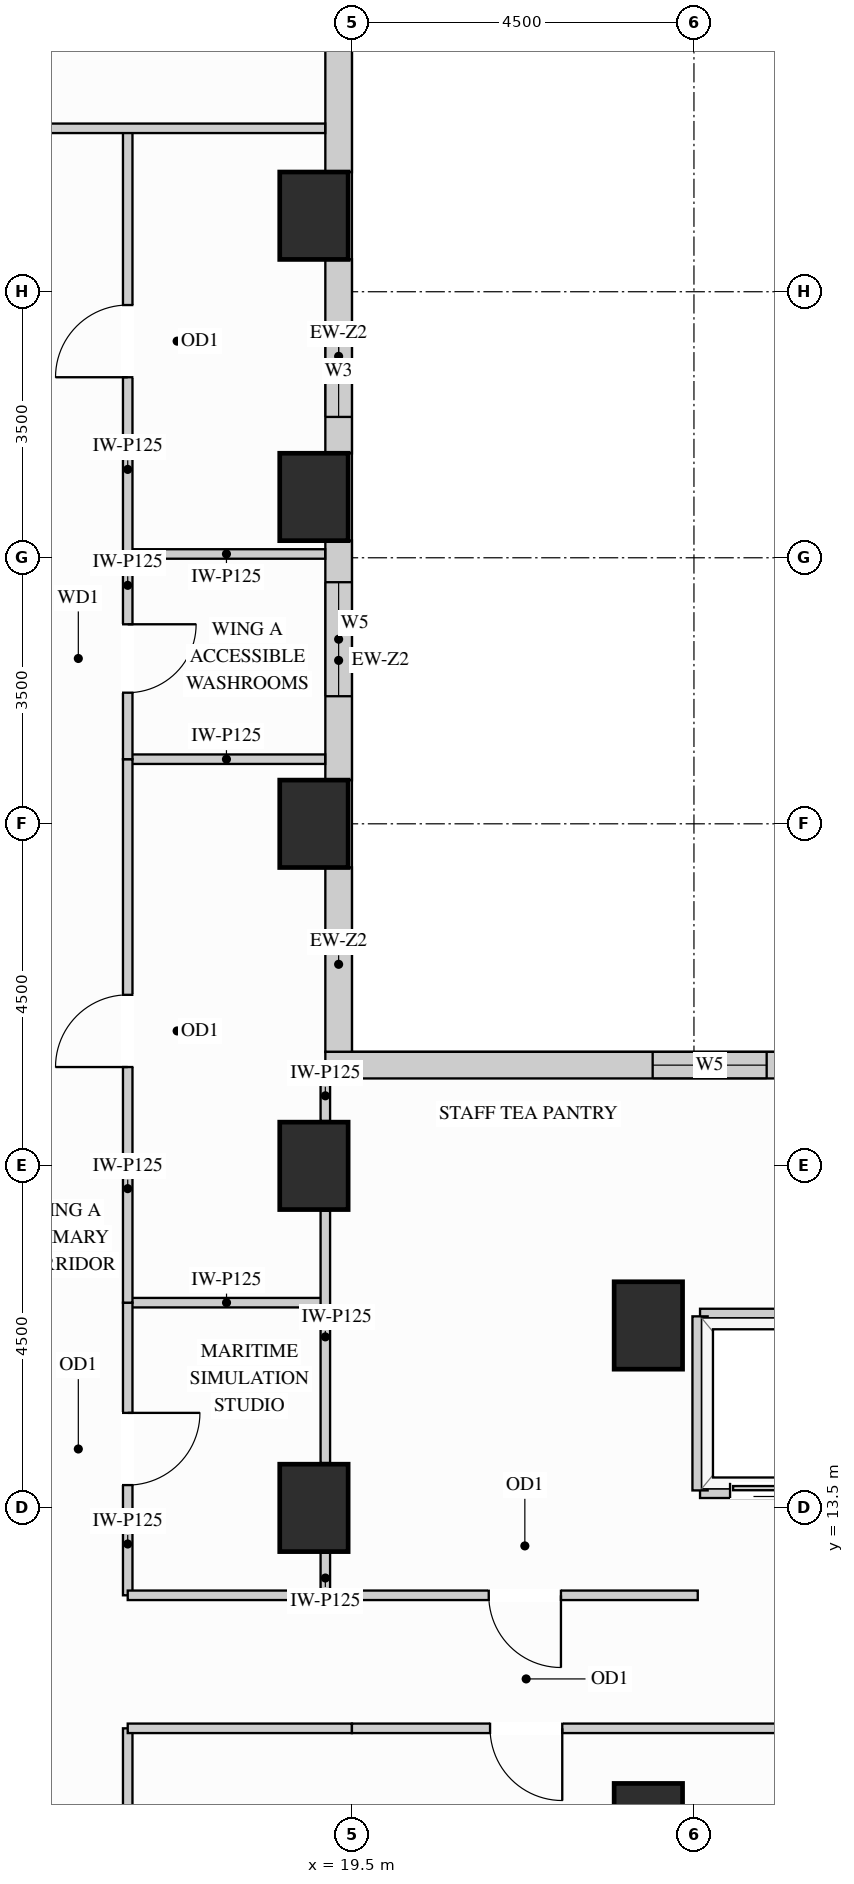
"""IFC4 building model, lengths in metres.
Left out: names, types, materials, properties, quantities, classifications, styles, units other than length and angle.
Written with IfcOpenShell. Run it as: python <this file> out.ifc"""

import sys

from ifc_helpers import new_model, si_unit, direction, frame, frame_2d, origin, origin_2d, place, context, subcontext, project, spatial, rectangle, extrude, source, transform, mapped, element, fill, save


model = new_model("IFC4")
c1 = context("Model", 3, precision=1e-05, world=origin(), true_north=direction((0.0, 1.0)))
c2 = subcontext(c1, "Body", "Model", "MODEL_VIEW")
j1 = project(units=[si_unit("LENGTHUNIT", "METRE"), si_unit("PLANEANGLEUNIT", "RADIAN")], contexts=[c1])
p1 = place(None, origin())
s1 = spatial("IfcSite", under=j1, at=p1, CompositionType="ELEMENT")
p2 = place(p1, origin())
s2 = spatial("IfcBuilding", under=s1, at=p2, CompositionType="ELEMENT")
p3 = place(p2, frame((0.0, 0.0, 102.6)))
s3 = spatial("IfcBuildingStorey", under=s2, at=p3, CompositionType="ELEMENT", Elevation=102.6)
m1 = source(origin(), c2, "Body", "SweptSolid", [
    extrude(rectangle(XDim=0.9, YDim=1.15, at=origin_2d()), origin(), (0.0, 0.0, 1.0), 3.38),
])
for number, where, z_axis, x_axis in (
    (1, (19.0, 13.5, 0.0), (0.0, 0.0, 1.0), (1.0, 0.0, 0.0)),
    (2, (19.0, 18.0, 0.0), (0.0, 0.0, 1.0), (1.0, 0.0, 0.0)),
    (3, (19.0, 22.5, 0.0), (0.0, 0.0, 1.0), (1.0, 0.0, 0.0)),
    (4, (19.0, 26.8, 0.0), (0.0, 0.0, 1.0), (1.0, 0.0, 0.0)),
    (5, (19.0, 30.5, 0.0), (0.0, 0.0, 1.0), (1.0, 0.0, 0.0)),
    (6, (23.4, 15.9, 0.0), (0.0, 0.0, 1.0), (1.0, 0.0, 0.0)),
    (7, (23.4, 9.3, 0.0), (0.0, 0.0, 1.0), (1.0, 0.0, 0.0)),
):
    element("IfcColumn", number, at=place(p3, frame(where, z_axis=z_axis, x_axis=x_axis)), inside=s3, PredefinedType="COLUMN", context=c2, shape_type="MappedRepresentation", body=[
        mapped(m1, transform((0.0, 0.0, 0.0), x_axis=(1.0, 0.0, 0.0), y_axis=(0.0, 1.0, 0.0), z_axis=(0.0, 0.0, 1.0))),
    ])
m2 = source(origin(), c2, "Body", "SweptSolid", [
    extrude(rectangle(XDim=2.429, YDim=0.35, at=frame_2d((1.214, 0.0))), origin(), (0.0, 0.0, 1.0), 2.519),
])
p4 = place(p3, frame((19.325, 19.498, 0.0), z_axis=(0.0, 0.0, 1.0), x_axis=(0.0, 1.0, 0.0)))
e8 = element("IfcWall", 8, at=p4, inside=s3, PredefinedType="SOLIDWALL", context=c2, shape_type="MappedRepresentation", body=[
    mapped(m2, transform((0.0, 0.0, 0.0), x_axis=(1.0, 0.0, 0.0), y_axis=(0.0, 1.0, 0.0), z_axis=(0.0, 0.0, 1.0))),
])
p5 = place(p3, frame((19.325, 23.073, 0.0), z_axis=(0.0, 0.0, 1.0), x_axis=(0.0, 1.0, 0.0)))
e9 = element("IfcWall", 9, at=p5, inside=s3, PredefinedType="SOLIDWALL", context=c2, shape_type="SweptSolid", body=[
    extrude(rectangle(XDim=3.154, YDim=0.35, at=frame_2d((1.577, 0.0))), origin(), (0.0, 0.0, 1.0), 2.519),
])
p6 = place(p5, frame((1.105, 0.0, 0.78)))
e10 = element("IfcOpeningElement", 10, at=p6, cuts=e9, PredefinedType="OPENING", context=c2, shape_type="SweptSolid", body=[
    extrude(rectangle(XDim=1.5, YDim=1.559, at=frame_2d((0.75, 0.78))), frame((0.0, 0.185, 0.0), z_axis=(0.0, -1.0, 0.0), x_axis=(1.0, 0.0, 0.0)), (0.0, 0.0, 1.0), 0.37),
])
p7 = place(p3, frame((19.325, 27.373, 0.0), z_axis=(0.0, 0.0, 1.0), x_axis=(0.0, 1.0, 0.0)))
e11 = element("IfcWall", 11, at=p7, inside=s3, PredefinedType="SOLIDWALL", context=c2, shape_type="SweptSolid", body=[
    extrude(rectangle(XDim=2.554, YDim=0.35, at=frame_2d((1.277, 0.0))), origin(), (0.0, 0.0, 1.0), 2.519),
])
p8 = place(p7, frame((0.48, 0.0, 0.78)))
e12 = element("IfcOpeningElement", 12, at=p8, cuts=e11, PredefinedType="OPENING", context=c2, shape_type="SweptSolid", body=[
    extrude(rectangle(XDim=1.2, YDim=1.559, at=frame_2d((0.6, 0.78))), frame((0.0, 0.185, 0.0), z_axis=(0.0, -1.0, 0.0), x_axis=(1.0, 0.0, 0.0)), (0.0, 0.0, 1.0), 0.37),
])
m3 = source(origin(), c2, "Body", "SweptSolid", [
    extrude(rectangle(XDim=3.354, YDim=0.35, at=frame_2d((1.677, 0.0))), origin(), (0.0, 0.0, 1.0), 2.519),
])
p9 = place(p3, frame((19.325, 31.073, 0.0), z_axis=(0.0, 0.0, 1.0), x_axis=(0.0, 1.0, 0.0)))
e13 = element("IfcWall", 13, at=p9, inside=s3, PredefinedType="SOLIDWALL", context=c2, shape_type="MappedRepresentation", body=[
    mapped(m3, transform((0.0, 0.0, 0.0), x_axis=(1.0, 0.0, 0.0), y_axis=(0.0, 1.0, 0.0), z_axis=(0.0, 0.0, 1.0))),
])
p10 = place(p3, frame((34.75, 19.325, 0.0), z_axis=(0.0, 0.0, 1.0), x_axis=(-1.0, 0.0, 0.0)))
e14 = element("IfcWall", 14, at=p10, inside=s3, PredefinedType="SOLIDWALL", context=c2, shape_type="SweptSolid", body=[
    extrude(rectangle(XDim=15.6, YDim=0.35, at=frame_2d((7.8, 0.0))), origin(), (0.0, 0.0, 1.0), 3.365),
])
p11 = place(p10, frame((4.307, 0.0, 0.78)))
e15 = element("IfcOpeningElement", 15, at=p11, cuts=e14, PredefinedType="OPENING", context=c2, shape_type="SweptSolid", body=[
    extrude(rectangle(XDim=1.5, YDim=2.0, at=frame_2d((0.75, 1.0))), frame((0.0, 0.185, 0.0), z_axis=(0.0, -1.0, 0.0), x_axis=(1.0, 0.0, 0.0)), (0.0, 0.0, 1.0), 0.37),
])
p12 = place(p10, frame((9.793, 0.0, 0.78)))
e16 = element("IfcOpeningElement", 16, at=p12, cuts=e14, PredefinedType="OPENING", context=c2, shape_type="SweptSolid", body=[
    extrude(rectangle(XDim=1.5, YDim=2.0, at=frame_2d((0.75, 1.0))), frame((0.0, 0.185, 0.0), z_axis=(0.0, -1.0, 0.0), x_axis=(1.0, 0.0, 0.0)), (0.0, 0.0, 1.0), 0.37),
])
m4 = source(origin(), c2, "Body", "SweptSolid", [
    extrude(rectangle(XDim=2.6, YDim=0.125, at=frame_2d((1.3, 0.0))), origin(), (0.0, 0.0, 1.0), 3.365),
])
p13 = place(p3, frame((16.55, 16.2, 0.0), z_axis=(0.0, 0.0, 1.0), x_axis=(1.0, 0.0, 0.0)))
e17 = element("IfcWall", 17, at=p13, inside=s3, PredefinedType="PARTITIONING", context=c2, shape_type="MappedRepresentation", body=[
    mapped(m4, transform((0.0, 0.0, 0.0), x_axis=(1.0, 0.0, 0.0), y_axis=(0.0, 1.0, 0.0), z_axis=(0.0, 0.0, 1.0))),
])
m5 = source(origin(), c2, "Body", "SweptSolid", [
    extrude(rectangle(XDim=2.598, YDim=0.125, at=frame_2d((1.299, 0.0))), origin(), (0.0, 0.0, 1.0), 3.365),
])
for number, where, z_axis, x_axis in (
    (18, (16.55, 23.35, 0.0), (0.0, 0.0, 1.0), (1.0, 0.0, 0.0)),
    (19, (16.55, 26.05, 0.0), (0.0, 0.0, 1.0), (1.0, 0.0, 0.0)),
):
    element("IfcWall", number, at=place(p3, frame(where, z_axis=z_axis, x_axis=x_axis)), inside=s3, PredefinedType="PARTITIONING", context=c2, shape_type="MappedRepresentation", body=[
        mapped(m5, transform((0.0, 0.0, 0.0), x_axis=(1.0, 0.0, 0.0), y_axis=(0.0, 1.0, 0.0), z_axis=(0.0, 0.0, 1.0))),
    ])
m6 = source(origin(), c2, "Body", "SweptSolid", [
    extrude(rectangle(XDim=0.56, YDim=0.125, at=frame_2d((0.28, 0.0))), origin(), (0.0, 0.0, 1.0), 2.677),
])
p14 = place(p3, frame((19.15, 12.35, 0.0), z_axis=(0.0, 0.0, 1.0), x_axis=(0.0, 1.0, 0.0)))
e20 = element("IfcWall", 20, at=p14, inside=s3, PredefinedType="PARTITIONING", context=c2, shape_type="MappedRepresentation", body=[
    mapped(m6, transform((0.0, 0.0, 0.0), x_axis=(1.0, 0.0, 0.0), y_axis=(0.0, 1.0, 0.0), z_axis=(0.0, 0.0, 1.0))),
])
m7 = source(origin(), c2, "Body", "SweptSolid", [
    extrude(rectangle(XDim=3.32, YDim=0.125, at=frame_2d((1.66, 0.0))), origin(), (0.0, 0.0, 1.0), 2.677),
])
p15 = place(p3, frame((19.15, 14.09, 0.0), z_axis=(0.0, 0.0, 1.0), x_axis=(0.0, 1.0, 0.0)))
e21 = element("IfcWall", 21, at=p15, inside=s3, PredefinedType="PARTITIONING", context=c2, shape_type="MappedRepresentation", body=[
    mapped(m7, transform((0.0, 0.0, 0.0), x_axis=(1.0, 0.0, 0.0), y_axis=(0.0, 1.0, 0.0), z_axis=(0.0, 0.0, 1.0))),
])
m8 = source(origin(), c2, "Body", "SweptSolid", [
    extrude(rectangle(XDim=0.558, YDim=0.125, at=frame_2d((0.279, 0.0))), origin(), (0.0, 0.0, 1.0), 2.519),
])
p16 = place(p3, frame((19.15, 18.59, 0.0), z_axis=(0.0, 0.0, 1.0), x_axis=(0.0, 1.0, 0.0)))
e22 = element("IfcWall", 22, at=p16, inside=s3, PredefinedType="PARTITIONING", context=c2, shape_type="MappedRepresentation", body=[
    mapped(m8, transform((0.0, 0.0, 0.0), x_axis=(1.0, 0.0, 0.0), y_axis=(0.0, 1.0, 0.0), z_axis=(0.0, 0.0, 1.0))),
])
p17 = place(p3, frame((16.55, 12.35, 0.0), z_axis=(0.0, 0.0, 1.0), x_axis=(0.0, 1.0, 0.0)))
e23 = element("IfcWall", 23, at=p17, inside=s3, PredefinedType="PARTITIONING", context=c2, shape_type="SweptSolid", body=[
    extrude(rectangle(XDim=3.85, YDim=0.125, at=frame_2d((1.925, 0.0))), origin(), (0.0, 0.0, 1.0), 3.365),
])
p18 = place(p17, frame((1.45, 0.0, 0.0)))
e24 = element("IfcOpeningElement", 24, at=p18, cuts=e23, PredefinedType="OPENING", context=c2, shape_type="SweptSolid", body=[
    extrude(rectangle(XDim=0.95, YDim=2.15, at=frame_2d((0.475, 1.075))), frame((0.0, 0.073, 0.0), z_axis=(0.0, -1.0, 0.0), x_axis=(1.0, 0.0, 0.0)), (0.0, 0.0, 1.0), 0.145),
])
p19 = place(p3, frame((16.55, 16.2, 0.0), z_axis=(0.0, 0.0, 1.0), x_axis=(0.0, 1.0, 0.0)))
e25 = element("IfcWall", 25, at=p19, inside=s3, PredefinedType="PARTITIONING", context=c2, shape_type="SweptSolid", body=[
    extrude(rectangle(XDim=7.15, YDim=0.125, at=frame_2d((3.575, 0.0))), origin(), (0.0, 0.0, 1.0), 3.365),
])
p20 = place(p19, frame((3.1, 0.0, 0.0)))
e26 = element("IfcOpeningElement", 26, at=p20, cuts=e25, PredefinedType="OPENING", context=c2, shape_type="SweptSolid", body=[
    extrude(rectangle(XDim=0.95, YDim=2.15, at=frame_2d((0.475, 1.075))), frame((0.0, 0.073, 0.0), z_axis=(0.0, -1.0, 0.0), x_axis=(1.0, 0.0, 0.0)), (0.0, 0.0, 1.0), 0.145),
])
p21 = place(p3, frame((16.55, 26.05, 0.0), z_axis=(0.0, 0.0, 1.0), x_axis=(0.0, 1.0, 0.0)))
e27 = element("IfcWall", 27, at=p21, inside=s3, PredefinedType="PARTITIONING", context=c2, shape_type="SweptSolid", body=[
    extrude(rectangle(XDim=5.6, YDim=0.125, at=frame_2d((2.8, 0.0))), origin(), (0.0, 0.0, 1.0), 3.365),
])
p22 = place(p21, frame((2.325, 0.0, 0.0)))
e28 = element("IfcOpeningElement", 28, at=p22, cuts=e27, PredefinedType="OPENING", context=c2, shape_type="SweptSolid", body=[
    extrude(rectangle(XDim=0.95, YDim=2.15, at=frame_2d((0.475, 1.075))), frame((0.0, 0.073, 0.0), z_axis=(0.0, -1.0, 0.0), x_axis=(1.0, 0.0, 0.0)), (0.0, 0.0, 1.0), 0.145),
])
p23 = place(p3, frame((16.55, 4.65, 0.0), z_axis=(0.0, 0.0, 1.0), x_axis=(0.0, 1.0, 0.0)))
e29 = element("IfcWall", 29, at=p23, inside=s3, PredefinedType="PARTITIONING", context=c2, shape_type="SweptSolid", body=[
    extrude(rectangle(XDim=5.95, YDim=0.125, at=frame_2d((2.975, 0.0))), origin(), (0.0, 0.0, 1.0), 3.365),
])
p24 = place(p23, frame((2.5, 0.0, 0.0)))
e30 = element("IfcOpeningElement", 30, at=p24, cuts=e29, PredefinedType="OPENING", context=c2, shape_type="SweptSolid", body=[
    extrude(rectangle(XDim=0.95, YDim=2.15, at=frame_2d((0.475, 1.075))), frame((0.0, 0.073, 0.0), z_axis=(0.0, -1.0, 0.0), x_axis=(1.0, 0.0, 0.0)), (0.0, 0.0, 1.0), 0.145),
])
p25 = place(p3, frame((16.55, 23.35, 0.0), z_axis=(0.0, 0.0, 1.0), x_axis=(0.0, 1.0, 0.0)))
e31 = element("IfcWall", 31, at=p25, inside=s3, PredefinedType="PARTITIONING", context=c2, shape_type="SweptSolid", body=[
    extrude(rectangle(XDim=2.7, YDim=0.125, at=frame_2d((1.35, 0.0))), origin(), (0.0, 0.0, 1.0), 3.365),
])
p26 = place(p25, frame((0.875, 0.0, 0.0)))
e32 = element("IfcOpeningElement", 32, at=p26, cuts=e31, PredefinedType="OPENING", context=c2, shape_type="SweptSolid", body=[
    extrude(rectangle(XDim=0.9, YDim=2.15, at=frame_2d((0.45, 1.075))), frame((0.0, 0.073, 0.0), z_axis=(0.0, -1.0, 0.0), x_axis=(1.0, 0.0, 0.0)), (0.0, 0.0, 1.0), 0.145),
])
m9 = source(origin(), c2, "Body", "SweptSolid", [
    extrude(rectangle(XDim=7.498, YDim=0.125, at=frame_2d((3.749, 0.0))), origin(), (0.0, 0.0, 1.0), 2.828),
])
p27 = place(p3, frame((11.65, 31.65, 0.0), z_axis=(0.0, 0.0, 1.0), x_axis=(1.0, 0.0, 0.0)))
e33 = element("IfcWall", 33, at=p27, inside=s3, PredefinedType="PARTITIONING", context=c2, shape_type="MappedRepresentation", body=[
    mapped(m9, transform((0.0, 0.0, 0.0), x_axis=(1.0, 0.0, 0.0), y_axis=(0.0, 1.0, 0.0), z_axis=(0.0, 0.0, 1.0))),
])
m10 = source(origin(), c2, "Body", "SweptSolid", [
    extrude(rectangle(XDim=2.95, YDim=0.125, at=frame_2d((1.475, 0.0))), origin(), (0.0, 0.0, 1.0), 3.365),
])
p28 = place(p3, frame((16.55, 12.35, 0.0), z_axis=(0.0, 0.0, 1.0), x_axis=(1.0, 0.0, 0.0)))
e34 = element("IfcWall", 34, at=p28, inside=s3, PredefinedType="PARTITIONING", context=c2, shape_type="MappedRepresentation", body=[
    mapped(m10, transform((0.0, 0.0, 0.0), x_axis=(1.0, 0.0, 0.0), y_axis=(0.0, 1.0, 0.0), z_axis=(0.0, 0.0, 1.0))),
])
p29 = place(p3, frame((19.5, 12.35, 0.0), z_axis=(0.0, 0.0, 1.0), x_axis=(1.0, 0.0, 0.0)))
e35 = element("IfcWall", 35, at=p29, inside=s3, PredefinedType="PARTITIONING", context=c2, shape_type="SweptSolid", body=[
    extrude(rectangle(XDim=4.55, YDim=0.125, at=frame_2d((2.275, 0.0))), origin(), (0.0, 0.0, 1.0), 3.365),
])
p30 = place(p29, frame((1.8, 0.0, 0.0)))
e36 = element("IfcOpeningElement", 36, at=p30, cuts=e35, PredefinedType="OPENING", context=c2, shape_type="SweptSolid", body=[
    extrude(rectangle(XDim=0.95, YDim=2.15, at=frame_2d((0.475, 1.075))), frame((0.0, 0.073, 0.0), z_axis=(0.0, -1.0, 0.0), x_axis=(1.0, 0.0, 0.0)), (0.0, 0.0, 1.0), 0.145),
])
p31 = place(p3, frame((16.55, 10.6, 0.0), z_axis=(0.0, 0.0, 1.0), x_axis=(1.0, 0.0, 0.0)))
e37 = element("IfcWall", 37, at=p31, inside=s3, PredefinedType="PARTITIONING", context=c2, shape_type="MappedRepresentation", body=[
    mapped(m10, transform((0.0, 0.0, 0.0), x_axis=(1.0, 0.0, 0.0), y_axis=(0.0, 1.0, 0.0), z_axis=(0.0, 0.0, 1.0))),
])
p32 = place(p3, frame((19.5, 10.6, 0.0), z_axis=(0.0, 0.0, 1.0), x_axis=(1.0, 0.0, 0.0)))
e38 = element("IfcWall", 38, at=p32, inside=s3, PredefinedType="PARTITIONING", context=c2, shape_type="SweptSolid", body=[
    extrude(rectangle(XDim=7.45, YDim=0.125, at=frame_2d((3.725, 0.0))), origin(), (0.0, 0.0, 1.0), 3.365),
])
p33 = place(p32, frame((1.817, 0.0, 0.0)))
e39 = element("IfcOpeningElement", 39, at=p33, cuts=e38, PredefinedType="OPENING", context=c2, shape_type="SweptSolid", body=[
    extrude(rectangle(XDim=0.95, YDim=2.15, at=frame_2d((0.475, 1.075))), frame((0.0, 0.073, 0.0), z_axis=(0.0, -1.0, 0.0), x_axis=(1.0, 0.0, 0.0)), (0.0, 0.0, 1.0), 0.145),
])
m11 = source(origin(), c2, "Body", "SweptSolid", [
    extrude(rectangle(XDim=1.89, YDim=0.2, at=frame_2d((0.945, 0.0))), origin(), (0.0, 0.0, 1.0), 2.677),
])
p34 = place(p3, frame((24.08, 16.02, 0.0), z_axis=(0.0, 0.0, 1.0), x_axis=(1.0, 0.0, 0.0)))
e40 = element("IfcWall", 40, at=p34, inside=s3, PredefinedType="PARTITIONING", context=c2, shape_type="MappedRepresentation", body=[
    mapped(m11, transform((0.0, 0.0, 0.0), x_axis=(1.0, 0.0, 0.0), y_axis=(0.0, 1.0, 0.0), z_axis=(0.0, 0.0, 1.0))),
])
p35 = place(p3, frame((24.08, 13.73, 0.0), z_axis=(0.0, 0.0, 1.0), x_axis=(1.0, 0.0, 0.0)))
e41 = element("IfcWall", 41, at=p35, inside=s3, PredefinedType="PARTITIONING", context=c2, shape_type="SweptSolid", body=[
    extrude(rectangle(XDim=1.89, YDim=0.2, at=frame_2d((0.945, 0.0))), origin(), (0.0, 0.0, 1.0), 2.446),
])
p36 = place(p35, frame((0.395, 0.0, 0.0)))
e42 = element("IfcOpeningElement", 42, at=p36, cuts=e41, PredefinedType="OPENING", context=c2, shape_type="SweptSolid", body=[
    extrude(rectangle(XDim=1.1, YDim=2.2, at=frame_2d((0.55, 1.1))), frame((0.0, 0.11, 0.0), z_axis=(0.0, -1.0, 0.0), x_axis=(1.0, 0.0, 0.0)), (0.0, 0.0, 1.0), 0.22),
])
m12 = source(origin(), c2, "Body", "SweptSolid", [
    extrude(rectangle(XDim=2.29, YDim=0.2, at=frame_2d((1.145, 0.0))), origin(), (0.0, 0.0, 1.0), 3.365),
])
p37 = place(p3, frame((24.08, 13.73, 0.0), z_axis=(0.0, 0.0, 1.0), x_axis=(0.0, 1.0, 0.0)))
e43 = element("IfcWall", 43, at=p37, inside=s3, PredefinedType="PARTITIONING", context=c2, shape_type="MappedRepresentation", body=[
    mapped(m12, transform((0.0, 0.0, 0.0), x_axis=(1.0, 0.0, 0.0), y_axis=(0.0, 1.0, 0.0), z_axis=(0.0, 0.0, 1.0))),
])
m13 = source(origin(), c2, "Body", "SweptSolid", [
    extrude(rectangle(XDim=1.1, YDim=2.2, at=frame_2d((0.55, 1.1))), frame((0.0, 0.025, 0.0), z_axis=(0.0, -1.0, 0.0), x_axis=(1.0, 0.0, 0.0)), (0.0, 0.0, 1.0), 0.05),
])
p38 = place(p36, origin())
e44 = element("IfcDoor", 44, at=p38, inside=s3, OperationType="SLIDING_TO_LEFT", PredefinedType="DOOR", context=c2, shape_type="MappedRepresentation", body=[
    mapped(m13, transform((0.0, 0.0, 0.0), x_axis=(1.0, 0.0, 0.0), y_axis=(0.0, 1.0, 0.0), z_axis=(0.0, 0.0, 1.0))),
])
fill(e42, e44)
m14 = source(origin(), c2, "Body", "SweptSolid", [
    extrude(rectangle(XDim=0.95, YDim=2.15, at=frame_2d((0.475, 1.075))), frame((0.0, 0.025, 0.0), z_axis=(0.0, -1.0, 0.0), x_axis=(1.0, 0.0, 0.0)), (0.0, 0.0, 1.0), 0.05),
])
p39 = place(p18, origin())
e45 = element("IfcDoor", 45, at=p39, inside=s3, OperationType="SINGLE_SWING_RIGHT", PredefinedType="DOOR", context=c2, shape_type="MappedRepresentation", body=[
    mapped(m14, transform((0.0, 0.0, 0.0), x_axis=(1.0, 0.0, 0.0), y_axis=(0.0, 1.0, 0.0), z_axis=(0.0, 0.0, 1.0))),
])
fill(e24, e45)
p40 = place(p20, origin())
e46 = element("IfcDoor", 46, at=p40, inside=s3, OperationType="SINGLE_SWING_LEFT", PredefinedType="DOOR", context=c2, shape_type="MappedRepresentation", body=[
    mapped(m14, transform((0.0, 0.0, 0.0), x_axis=(1.0, 0.0, 0.0), y_axis=(0.0, 1.0, 0.0), z_axis=(0.0, 0.0, 1.0))),
])
fill(e26, e46)
p41 = place(p22, origin())
e47 = element("IfcDoor", 47, at=p41, inside=s3, OperationType="SINGLE_SWING_LEFT", PredefinedType="DOOR", context=c2, shape_type="MappedRepresentation", body=[
    mapped(m14, transform((0.0, 0.0, 0.0), x_axis=(1.0, 0.0, 0.0), y_axis=(0.0, 1.0, 0.0), z_axis=(0.0, 0.0, 1.0))),
])
fill(e28, e47)
p42 = place(p30, origin())
e48 = element("IfcDoor", 48, at=p42, inside=s3, OperationType="SINGLE_SWING_RIGHT", PredefinedType="DOOR", context=c2, shape_type="MappedRepresentation", body=[
    mapped(m14, transform((0.0, 0.0, 0.0), x_axis=(1.0, 0.0, 0.0), y_axis=(0.0, 1.0, 0.0), z_axis=(0.0, 0.0, 1.0))),
])
fill(e36, e48)
p43 = place(p33, origin())
e49 = element("IfcDoor", 49, at=p43, inside=s3, OperationType="SINGLE_SWING_RIGHT", PredefinedType="DOOR", context=c2, shape_type="MappedRepresentation", body=[
    mapped(m14, transform((0.0, 0.0, 0.0), x_axis=(1.0, 0.0, 0.0), y_axis=(0.0, 1.0, 0.0), z_axis=(0.0, 0.0, 1.0))),
])
fill(e39, e49)
m15 = source(origin(), c2, "Body", "SweptSolid", [
    extrude(rectangle(XDim=0.9, YDim=2.15, at=frame_2d((0.45, 1.075))), frame((0.0, 0.025, 0.0), z_axis=(0.0, -1.0, 0.0), x_axis=(1.0, 0.0, 0.0)), (0.0, 0.0, 1.0), 0.05),
])
p44 = place(p26, origin())
e50 = element("IfcDoor", 50, at=p44, inside=s3, OperationType="SINGLE_SWING_RIGHT", PredefinedType="DOOR", context=c2, shape_type="MappedRepresentation", body=[
    mapped(m15, transform((0.0, 0.0, 0.0), x_axis=(1.0, 0.0, 0.0), y_axis=(0.0, 1.0, 0.0), z_axis=(0.0, 0.0, 1.0))),
])
fill(e32, e50)
m16 = source(origin(), c2, "Body", "SweptSolid", [
    extrude(rectangle(XDim=1.2, YDim=1.559, at=frame_2d((0.6, 0.78))), frame((0.0, 0.03, 0.0), z_axis=(0.0, -1.0, 0.0), x_axis=(1.0, 0.0, 0.0)), (0.0, 0.0, 1.0), 0.06),
])
p45 = place(p8, origin())
e51 = element("IfcWindow", 51, at=p45, inside=s3, PartitioningType="SINGLE_PANEL", PredefinedType="WINDOW", context=c2, shape_type="MappedRepresentation", body=[
    mapped(m16, transform((0.0, 0.0, 0.0), x_axis=(1.0, 0.0, 0.0), y_axis=(0.0, 1.0, 0.0), z_axis=(0.0, 0.0, 1.0))),
])
fill(e12, e51)
m17 = source(origin(), c2, "Body", "SweptSolid", [
    extrude(rectangle(XDim=1.5, YDim=1.559, at=frame_2d((0.75, 0.78))), frame((0.0, 0.03, 0.0), z_axis=(0.0, -1.0, 0.0), x_axis=(1.0, 0.0, 0.0)), (0.0, 0.0, 1.0), 0.06),
])
p46 = place(p6, origin())
e52 = element("IfcWindow", 52, at=p46, inside=s3, PartitioningType="SINGLE_PANEL", PredefinedType="WINDOW", context=c2, shape_type="MappedRepresentation", body=[
    mapped(m17, transform((0.0, 0.0, 0.0), x_axis=(1.0, 0.0, 0.0), y_axis=(0.0, 1.0, 0.0), z_axis=(0.0, 0.0, 1.0))),
])
fill(e10, e52)
m18 = source(origin(), c2, "Body", "SweptSolid", [
    extrude(rectangle(XDim=1.5, YDim=2.0, at=frame_2d((0.75, 1.0))), frame((0.0, 0.03, 0.0), z_axis=(0.0, -1.0, 0.0), x_axis=(1.0, 0.0, 0.0)), (0.0, 0.0, 1.0), 0.06),
])
p47 = place(p12, origin())
e53 = element("IfcWindow", 53, at=p47, inside=s3, PartitioningType="SINGLE_PANEL", PredefinedType="WINDOW", context=c2, shape_type="MappedRepresentation", body=[
    mapped(m18, transform((0.0, 0.0, 0.0), x_axis=(1.0, 0.0, 0.0), y_axis=(0.0, 1.0, 0.0), z_axis=(0.0, 0.0, 1.0))),
])
fill(e16, e53)
save(model, sys.argv[1])
